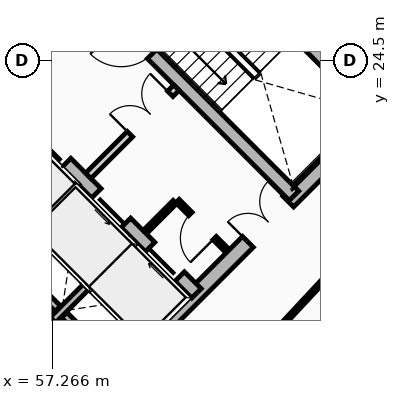
"""IFC4 building model, lengths in metres.
Left out: names, types, materials, properties, quantities, classifications, styles, units other than length and angle.
Written with IfcOpenShell. Run it as: python <this file> out.ifc"""

import sys

from ifc_helpers import new_model, si_unit, direction, frame, frame_2d, origin, place, context, subcontext, project, spatial, rectangle, extrude, source, transform, mapped, element, fill, save


model = new_model("IFC4")
c1 = context("Model", 3, precision=1e-05, world=origin(), true_north=direction((0.0, 1.0)))
c2 = subcontext(c1, "Body", "Model", "MODEL_VIEW")
j1 = project(units=[si_unit("LENGTHUNIT", "METRE"), si_unit("PLANEANGLEUNIT", "RADIAN")], contexts=[c1])
p1 = place(None, origin())
s1 = spatial("IfcSite", under=j1, at=p1, CompositionType="ELEMENT")
p2 = place(p1, origin())
s2 = spatial("IfcBuilding", under=s1, at=p2, CompositionType="ELEMENT")
p3 = place(p2, frame((0.0, 0.0, 196.66)))
s3 = spatial("IfcBuildingStorey", under=s2, at=p3, CompositionType="ELEMENT", Elevation=196.66)
for number, where, z_axis, x_axis in (
    (1, (58.702, 15.732, 0.0), (0.0, 0.0, 1.0), (-0.707, 0.707, 0.0)),
    (2, (66.268, 23.298, 0.0), (0.0, 0.0, 1.0), (-0.707, 0.707, 0.0)),
):
    element("IfcWall", number, at=place(p3, frame(where, z_axis=z_axis, x_axis=x_axis)), inside=s3, PredefinedType="SHEAR", context=c2, shape_type="SweptSolid", body=[
        extrude(rectangle(XDim=14.1, YDim=0.4, at=frame_2d((7.05, 0.0))), origin(), (0.0, 0.0, 1.0), 2.91),
    ])
p4 = place(p3, frame((58.561, 15.873, 0.0), z_axis=(0.0, 0.0, 1.0), x_axis=(0.707106781187, 0.707106781187, 0.0)))
e3 = element("IfcWall", 3, at=p4, inside=s3, PredefinedType="SHEAR", context=c2, shape_type="SweptSolid", body=[
    extrude(rectangle(XDim=10.7, YDim=0.4, at=frame_2d((5.35, 0.0))), origin(), (0.0, 0.0, 1.0), 2.91),
])
m1 = source(origin(), c2, "Body", "SweptSolid", [
    extrude(rectangle(XDim=1.5, YDim=2.02, at=frame_2d((0.75, 1.01))), frame((0.0, 0.21, 0.0), z_axis=(0.0, -1.0, 0.0), x_axis=(1.0, 0.0, 0.0)), (0.0, 0.0, 1.0), 0.42),
])
p5 = place(p4, frame((5.45, 0.0, 0.0)))
e4 = element("IfcOpeningElement", 4, at=p5, cuts=e3, PredefinedType="OPENING", context=c2, shape_type="MappedRepresentation", body=[
    mapped(m1, transform((0.0, 0.0, 0.0), x_axis=(1.0, 0.0, 0.0), y_axis=(0.0, 1.0, 0.0), z_axis=(0.0, 0.0, 1.0), scale=1.0)),
])
p6 = place(p3, frame((61.06, 18.373, 0.0), z_axis=(0.0, 0.0, 1.0), x_axis=(-0.707106781187, 0.707106781187, 0.0)))
e5 = element("IfcWall", 5, at=p6, inside=s3, PredefinedType="SHEAR", context=c2, shape_type="SweptSolid", body=[
    extrude(rectangle(XDim=13.7, YDim=0.35, at=frame_2d((6.85, 0.0))), origin(), (0.0, 0.0, 1.0), 2.91),
])
m2 = source(origin(), c2, "Body", "SweptSolid", [
    extrude(rectangle(XDim=1.1, YDim=2.015, at=frame_2d((0.55, 1.007))), frame((0.0, 0.185, 0.0), z_axis=(0.0, -1.0, 0.0), x_axis=(1.0, 0.0, 0.0)), (0.0, 0.0, 1.0), 0.37),
])
p7 = place(p6, frame((4.85, 0.0, 0.0)))
e6 = element("IfcOpeningElement", 6, at=p7, cuts=e5, PredefinedType="OPENING", context=c2, shape_type="MappedRepresentation", body=[
    mapped(m2, transform((0.0, 0.0, 0.0), x_axis=(1.0, 0.0, 0.0), y_axis=(0.0, 1.0, 0.0), z_axis=(0.0, 0.0, 1.0), scale=1.0)),
])
p8 = place(p6, frame((0.625, 0.0, 0.0)))
e7 = element("IfcOpeningElement", 7, at=p8, cuts=e5, PredefinedType="OPENING", context=c2, shape_type="MappedRepresentation", body=[
    mapped(m2, transform((0.0, 0.0, 0.0), x_axis=(1.0, 0.0, 0.0), y_axis=(0.0, 1.0, 0.0), z_axis=(0.0, 0.0, 1.0), scale=1.0)),
])
p9 = place(p6, frame((2.625, 0.0, 0.0)))
e8 = element("IfcOpeningElement", 8, at=p9, cuts=e5, PredefinedType="OPENING", context=c2, shape_type="MappedRepresentation", body=[
    mapped(m2, transform((0.0, 0.0, 0.0), x_axis=(1.0, 0.0, 0.0), y_axis=(0.0, 1.0, 0.0), z_axis=(0.0, 0.0, 1.0), scale=1.0)),
])
m3 = source(origin(), c2, "Body", "SweptSolid", [
    extrude(rectangle(XDim=1.15, YDim=2.02, at=frame_2d((0.575, 1.01))), frame((0.0, 0.185, 0.0), z_axis=(0.0, -1.0, 0.0), x_axis=(1.0, 0.0, 0.0)), (0.0, 0.0, 1.0), 0.37),
])
p10 = place(p6, frame((7.27, 0.0, 0.0)))
e9 = element("IfcOpeningElement", 9, at=p10, cuts=e5, PredefinedType="OPENING", context=c2, shape_type="MappedRepresentation", body=[
    mapped(m3, transform((0.0, 0.0, 0.0), x_axis=(1.0, 0.0, 0.0), y_axis=(0.0, 1.0, 0.0), z_axis=(0.0, 0.0, 1.0), scale=1.0)),
])
p11 = place(p3, frame((63.627, 20.94, 0.0), z_axis=(0.0, 0.0, 1.0), x_axis=(-0.707119496762, 0.707094065383, 0.0)))
e10 = element("IfcWall", 10, at=p11, inside=s3, PredefinedType="SHEAR", context=c2, shape_type="SweptSolid", body=[
    extrude(rectangle(XDim=9.6, YDim=0.35, at=frame_2d((4.8, 0.0))), origin(), (0.0, 0.0, 1.0), 2.91),
])
p12 = place(p11, frame((5.28, 0.0, 0.0)))
e11 = element("IfcOpeningElement", 11, at=p12, cuts=e10, PredefinedType="OPENING", context=c2, shape_type="MappedRepresentation", body=[
    mapped(m3, transform((0.0, 0.0, 0.0), x_axis=(1.0, 0.0, 0.0), y_axis=(0.0, 1.0, 0.0), z_axis=(0.0, 0.0, 1.0), scale=1.0)),
])
p13 = place(p3, frame((65.812, 23.125, 0.0), z_axis=(0.0, 0.0, 1.0), x_axis=(-0.707106781187, 0.707106781187, 0.0)))
e12 = element("IfcWall", 12, at=p13, inside=s3, PredefinedType="SHEAR", context=c2, shape_type="SweptSolid", body=[
    extrude(rectangle(XDim=6.695, YDim=0.35, at=frame_2d((3.348, 0.0))), origin(), (0.0, 0.0, 1.0), 2.91),
])
p14 = place(p3, frame((55.888, 19.069, 0.0), z_axis=(0.0, 0.0, 1.0), x_axis=(0.707106781187, 0.707106781187, 0.0)))
e13 = element("IfcWall", 13, at=p14, inside=s3, PredefinedType="SHEAR", context=c2, shape_type="SweptSolid", body=[
    extrude(rectangle(XDim=2.97, YDim=0.2, at=frame_2d((1.485, 0.0))), origin(), (0.0, 0.0, 1.0), 2.91),
])
p15 = place(p3, frame((57.284, 17.673, 0.0), z_axis=(0.0, 0.0, 1.0), x_axis=(0.707147878904, 0.70706568108, 0.0)))
e14 = element("IfcWall", 14, at=p15, inside=s3, PredefinedType="SHEAR", context=c2, shape_type="SweptSolid", body=[
    extrude(rectangle(XDim=2.97, YDim=0.2, at=frame_2d((1.485, 0.0))), origin(), (0.0, 0.0, 1.0), 2.91),
])
p16 = place(p3, frame((57.412, 17.97, 0.0), z_axis=(0.0, 0.0, 1.0), x_axis=(-0.707106781187, 0.707106781187, 0.0)))
e15 = element("IfcWall", 15, at=p16, inside=s3, PredefinedType="SHEAR", context=c2, shape_type="SweptSolid", body=[
    extrude(rectangle(XDim=1.735, YDim=0.2, at=frame_2d((0.867, 0.0))), origin(), (0.0, 0.0, 1.0), 2.91),
])
p17 = place(p3, frame((58.737, 16.644, 0.0), z_axis=(0.0, 0.0, 1.0), x_axis=(-0.707032117043, 0.707181437447, 0.0)))
e16 = element("IfcWall", 16, at=p17, inside=s3, PredefinedType="SHEAR", context=c2, shape_type="SweptSolid", body=[
    extrude(rectangle(XDim=1.635, YDim=0.2, at=frame_2d((0.817, 0.0))), origin(), (0.0, 0.0, 1.0), 2.91),
])
p18 = place(p3, frame((58.214, 21.467, 0.0), z_axis=(0.0, 0.0, 1.0), x_axis=(0.707106781187, 0.707106781187, 0.0)))
e17 = element("IfcWall", 17, at=p18, inside=s3, PredefinedType="PARTITIONING", context=c2, shape_type="SweptSolid", body=[
    extrude(rectangle(XDim=3.28, YDim=0.2, at=frame_2d((1.64, 0.0))), origin(), (0.0, 0.0, 1.0), 2.685),
])
m4 = source(origin(), c2, "Body", "SweptSolid", [
    extrude(rectangle(XDim=1.5, YDim=2.02, at=frame_2d((0.75, 1.01))), frame((0.0, 0.11, 0.0), z_axis=(0.0, -1.0, 0.0), x_axis=(1.0, 0.0, 0.0)), (0.0, 0.0, 1.0), 0.22),
])
p19 = place(p18, frame((1.55, 0.0, 0.0)))
e18 = element("IfcOpeningElement", 18, at=p19, cuts=e17, PredefinedType="OPENING", context=c2, shape_type="MappedRepresentation", body=[
    mapped(m4, transform((0.0, 0.0, 0.0), x_axis=(1.0, 0.0, 0.0), y_axis=(0.0, 1.0, 0.0), z_axis=(0.0, 0.0, 1.0), scale=1.0)),
])
p20 = place(p3, frame((54.961, 24.719, 0.0), z_axis=(0.0, 0.0, 1.0), x_axis=(0.707106781187, 0.707106781187, 0.0)))
e19 = element("IfcWall", 19, at=p20, inside=s3, PredefinedType="PARTITIONING", context=c2, shape_type="SweptSolid", body=[
    extrude(rectangle(XDim=3.28, YDim=0.2, at=frame_2d((1.64, 0.0))), origin(), (0.0, 0.0, 1.0), 2.685),
])
m5 = source(origin(), c2, "Body", "SweptSolid", [
    extrude(rectangle(XDim=0.9, YDim=2.005, at=frame_2d((0.45, 1.002))), frame((0.0, 0.11, 0.0), z_axis=(0.0, -1.0, 0.0), x_axis=(1.0, 0.0, 0.0)), (0.0, 0.0, 1.0), 0.22),
])
p21 = place(p20, frame((0.16, 0.0, 0.0)))
e20 = element("IfcOpeningElement", 20, at=p21, cuts=e19, PredefinedType="OPENING", context=c2, shape_type="MappedRepresentation", body=[
    mapped(m5, transform((0.0, 0.0, 0.0), x_axis=(1.0, 0.0, 0.0), y_axis=(0.0, 1.0, 0.0), z_axis=(0.0, 0.0, 1.0), scale=1.0)),
])
p22 = place(p3, frame((61.835, 19.529, 0.0), z_axis=(0.0, 0.0, 1.0), x_axis=(-0.707174592913, 0.707038962956, 0.0)))
e21 = element("IfcWall", 21, at=p22, inside=s3, PredefinedType="PARTITIONING", context=c2, shape_type="SweptSolid", body=[
    extrude(rectangle(XDim=1.8, YDim=0.125, at=frame_2d((0.9, 0.0))), origin(), (0.0, 0.0, 1.0), 2.685),
])
m6 = source(origin(), c2, "Body", "SweptSolid", [
    extrude(rectangle(XDim=0.9, YDim=2.005, at=frame_2d((0.45, 1.002))), frame((0.0, 0.073, 0.0), z_axis=(0.0, -1.0, 0.0), x_axis=(1.0, 0.0, 0.0)), (0.0, 0.0, 1.0), 0.145),
])
p23 = place(p22, frame((0.42, 0.0, 0.0)))
e22 = element("IfcOpeningElement", 22, at=p23, cuts=e21, PredefinedType="OPENING", context=c2, shape_type="MappedRepresentation", body=[
    mapped(m6, transform((0.0, 0.0, 0.0), x_axis=(1.0, 0.0, 0.0), y_axis=(0.0, 1.0, 0.0), z_axis=(0.0, 0.0, 1.0), scale=1.0)),
])
p24 = place(p3, frame((59.713, 19.996, 0.0), z_axis=(0.0, 0.0, 1.0), x_axis=(0.707217726, 0.706995818963, 0.0)))
e23 = element("IfcWall", 23, at=p24, inside=s3, PredefinedType="PARTITIONING", context=c2, shape_type="SweptSolid", body=[
    extrude(rectangle(XDim=1.1, YDim=0.125, at=frame_2d((0.55, 0.0))), origin(), (0.0, 0.0, 1.0), 2.685),
])
p25 = place(p3, frame((62.736, 16.924, 0.0), z_axis=(0.0, 0.0, 1.0), x_axis=(0.681946700833, 0.731401871219, 0.0)))
e24 = element("IfcWall", 24, at=p25, inside=s3, PredefinedType="MOVABLE", context=c2, shape_type="SweptSolid", body=[
    extrude(rectangle(XDim=6.393, YDim=0.1, at=frame_2d((3.196, 0.0))), origin(), (0.0, 0.0, 1.0), 2.255),
])
m7 = source(origin(), c2, "Body", "SweptSolid", [
    extrude(rectangle(XDim=1.1, YDim=2.015, at=frame_2d((0.55, 1.007))), frame((0.0, 0.025, 0.0), z_axis=(0.0, -1.0, 0.0), x_axis=(1.0, 0.0, 0.0)), (0.0, 0.0, 1.0), 0.05),
])
p26 = place(p7, origin())
e25 = element("IfcDoor", 25, at=p26, inside=s3, OperationType="SLIDING_TO_RIGHT", PredefinedType="DOOR", context=c2, shape_type="MappedRepresentation", body=[
    mapped(m7, transform((0.0, 0.0, 0.0), x_axis=(1.0, 0.0, 0.0), y_axis=(0.0, 1.0, 0.0), z_axis=(0.0, 0.0, 1.0), scale=1.0)),
])
fill(e6, e25)
p27 = place(p8, origin())
e26 = element("IfcDoor", 26, at=p27, inside=s3, OperationType="SLIDING_TO_RIGHT", PredefinedType="DOOR", context=c2, shape_type="MappedRepresentation", body=[
    mapped(m7, transform((0.0, 0.0, 0.0), x_axis=(1.0, 0.0, 0.0), y_axis=(0.0, 1.0, 0.0), z_axis=(0.0, 0.0, 1.0), scale=1.0)),
])
fill(e7, e26)
p28 = place(p9, origin())
e27 = element("IfcDoor", 27, at=p28, inside=s3, OperationType="SLIDING_TO_LEFT", PredefinedType="DOOR", context=c2, shape_type="MappedRepresentation", body=[
    mapped(m7, transform((0.0, 0.0, 0.0), x_axis=(1.0, 0.0, 0.0), y_axis=(0.0, 1.0, 0.0), z_axis=(0.0, 0.0, 1.0), scale=1.0)),
])
fill(e8, e27)
m8 = source(origin(), c2, "Body", "SweptSolid", [
    extrude(rectangle(XDim=1.15, YDim=2.02, at=frame_2d((0.575, 1.01))), frame((0.0, 0.025, 0.0), z_axis=(0.0, -1.0, 0.0), x_axis=(1.0, 0.0, 0.0)), (0.0, 0.0, 1.0), 0.05),
])
p29 = place(p12, origin())
e28 = element("IfcDoor", 28, at=p29, inside=s3, OperationType="SINGLE_SWING_RIGHT", PredefinedType="DOOR", context=c2, shape_type="MappedRepresentation", body=[
    mapped(m8, transform((0.0, 0.0, 0.0), x_axis=(1.0, 0.0, 0.0), y_axis=(0.0, 1.0, 0.0), z_axis=(0.0, 0.0, 1.0), scale=1.0)),
])
fill(e11, e28)
m9 = source(origin(), c2, "Body", "SweptSolid", [
    extrude(rectangle(XDim=1.5, YDim=2.02, at=frame_2d((0.75, 1.01))), frame((0.0, 0.025, 0.0), z_axis=(0.0, -1.0, 0.0), x_axis=(1.0, 0.0, 0.0)), (0.0, 0.0, 1.0), 0.05),
])
p30 = place(p5, origin())
e29 = element("IfcDoor", 29, at=p30, inside=s3, OperationType="DOUBLE_DOOR_SINGLE_SWING", PredefinedType="DOOR", context=c2, shape_type="MappedRepresentation", body=[
    mapped(m9, transform((0.0, 0.0, 0.0), x_axis=(1.0, 0.0, 0.0), y_axis=(0.0, 1.0, 0.0), z_axis=(0.0, 0.0, 1.0), scale=1.0)),
])
fill(e4, e29)
p31 = place(p19, origin())
e30 = element("IfcDoor", 30, at=p31, inside=s3, OperationType="DOUBLE_DOOR_SINGLE_SWING", PredefinedType="DOOR", context=c2, shape_type="MappedRepresentation", body=[
    mapped(m9, transform((0.0, 0.0, 0.0), x_axis=(1.0, 0.0, 0.0), y_axis=(0.0, 1.0, 0.0), z_axis=(0.0, 0.0, 1.0), scale=1.0)),
])
fill(e18, e30)
m10 = source(origin(), c2, "Body", "SweptSolid", [
    extrude(rectangle(XDim=0.9, YDim=2.005, at=frame_2d((0.45, 1.002))), frame((0.0, 0.025, 0.0), z_axis=(0.0, -1.0, 0.0), x_axis=(1.0, 0.0, 0.0)), (0.0, 0.0, 1.0), 0.05),
])
p32 = place(p23, origin())
e31 = element("IfcDoor", 31, at=p32, inside=s3, OperationType="SINGLE_SWING_LEFT", PredefinedType="DOOR", context=c2, shape_type="MappedRepresentation", body=[
    mapped(m10, transform((0.0, 0.0, 0.0), x_axis=(1.0, 0.0, 0.0), y_axis=(0.0, 1.0, 0.0), z_axis=(0.0, 0.0, 1.0), scale=1.0)),
])
fill(e22, e31)
save(model, sys.argv[1])
